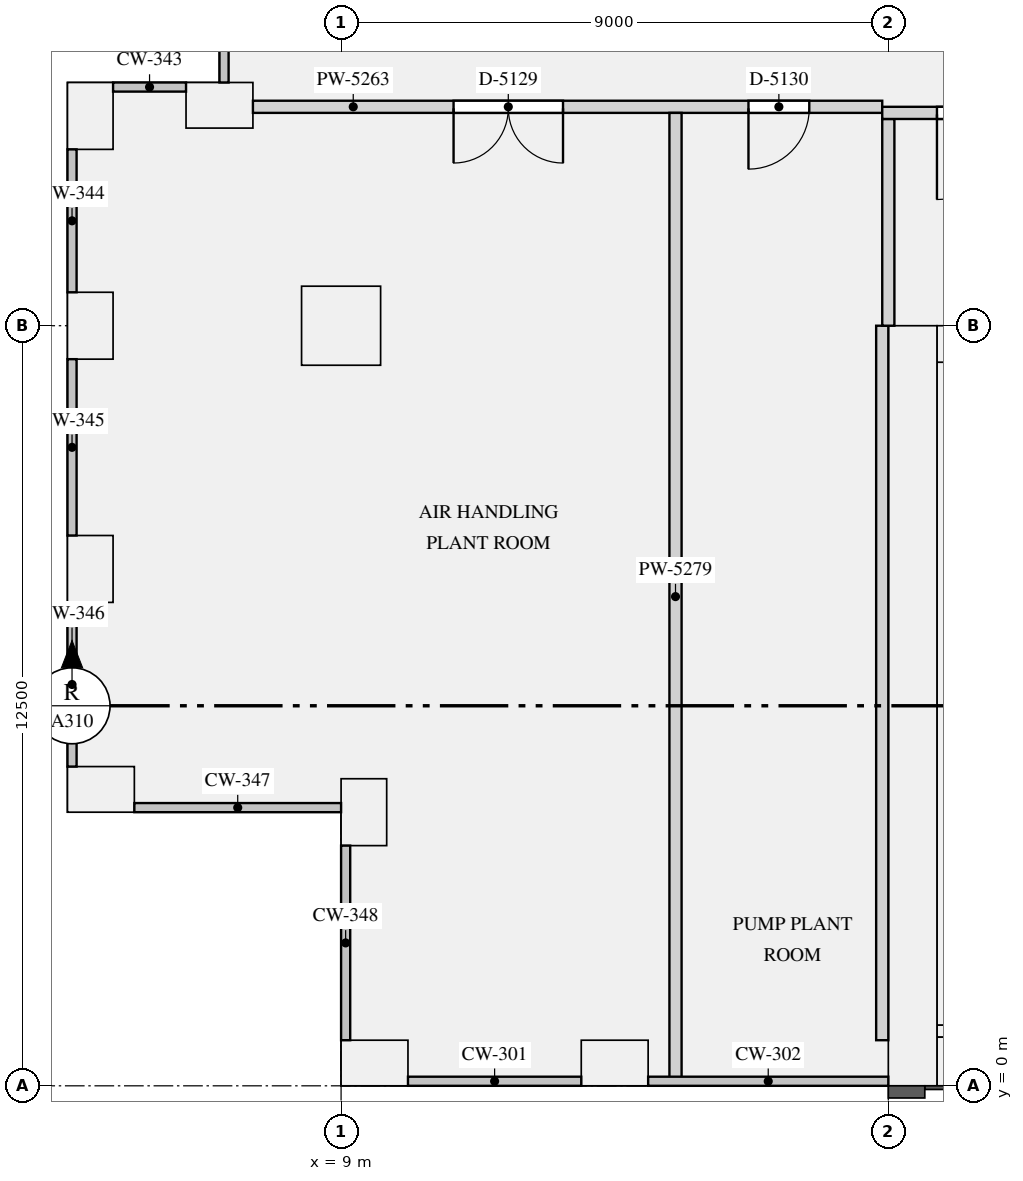
"""IFC4 building model, lengths in metres.
Left out: names, types, materials, properties, quantities, classifications, styles, units other than length and angle.
Written with IfcOpenShell. Run it as: python <this file> out.ifc"""

import sys

from ifc_helpers import new_model, si_unit, direction, frame, frame_2d, origin, origin_2d, place, context, subcontext, project, spatial, rectangle, extrude, element, fill, save


model = new_model("IFC4")
c1 = context("Model", 3, precision=1e-05, world=origin(), true_north=direction((0.0, 1.0)))
c2 = subcontext(c1, "Body", "Model", "MODEL_VIEW")
j1 = project(units=[si_unit("LENGTHUNIT", "METRE"), si_unit("PLANEANGLEUNIT", "RADIAN")], contexts=[c1])
p1 = place(None, origin())
s1 = spatial("IfcSite", under=j1, at=p1, CompositionType="ELEMENT")
p2 = place(p1, origin())
s2 = spatial("IfcBuilding", under=s1, at=p2, CompositionType="ELEMENT")
p3 = place(p2, frame((0.0, 0.0, 137.1)))
s3 = spatial("IfcBuildingStorey", under=s2, at=p3, CompositionType="ELEMENT", Elevation=137.1)
for number, where, z_axis, x_axis in (
    (1, (9.55, 0.375, 0.0), (0.0, 0.0, 1.0), (1.0, 0.0, 0.0)),
    (2, (13.5, 0.375, 0.0), (0.0, 0.0, 1.0), (1.0, 0.0, 0.0)),
    (3, (5.05, 4.875, 0.0), (0.0, 0.0, 1.0), (1.0, 0.0, 0.0)),
    (4, (9.375, 4.5, 0.0), (0.0, 0.0, 1.0), (0.0, -1.0, 0.0)),
    (5, (4.875, 15.95, 0.0), (0.0, 0.0, 1.0), (0.0, -1.0, 0.0)),
    (6, (4.875, 12.5, 0.0), (0.0, 0.0, 1.0), (0.0, -1.0, 0.0)),
    (7, (4.875, 8.5, 0.0), (0.0, 0.0, 1.0), (0.0, -1.0, 0.0)),
    (8, (7.0, 16.125, 0.0), (0.0, 0.0, 1.0), (-1.0, 0.0, 0.0)),
):
    element("IfcColumn", number, at=place(p3, frame(where, z_axis=z_axis, x_axis=x_axis)), inside=s3, PredefinedType="USERDEFINED", context=c2, shape_type="SweptSolid", body=[
        extrude(rectangle(XDim=1.1, YDim=0.75, at=origin_2d()), origin(), (0.0, 0.0, 1.0), 4.2),
    ])
p4 = place(p3, frame((9.0, 12.5, 0.0), z_axis=(0.0, 0.0, 1.0), x_axis=(1.0, 0.0, 0.0)))
e9 = element("IfcColumn", 9, at=p4, inside=s3, PredefinedType="COLUMN", context=c2, shape_type="SweptSolid", body=[
    extrude(rectangle(XDim=1.3, YDim=1.3, at=origin_2d()), origin(), (0.0, 0.0, 1.0), 4.2),
])
p5 = place(p3, frame((18.4, 0.0, 0.0), z_axis=(0.0, 0.0, 1.0), x_axis=(0.0, 1.0, 0.0)))
e10 = element("IfcWall", 10, at=p5, inside=s3, PredefinedType="SHEAR", context=c2, shape_type="SweptSolid", body=[
    extrude(rectangle(XDim=12.5, YDim=0.8, at=frame_2d((6.25, 0.0))), origin(), (0.0, 0.0, 1.0), 4.2),
])
p6 = place(p3, frame((18.8, 0.4, 0.0), z_axis=(0.0, 0.0, 1.0), x_axis=(1.0, 0.0, 0.0)))
e11 = element("IfcWall", 11, at=p6, inside=s3, PredefinedType="SHEAR", context=c2, shape_type="SweptSolid", body=[
    extrude(rectangle(XDim=34.4, YDim=0.8, at=frame_2d((17.2, 0.0))), origin(), (0.0, 0.0, 1.0), 4.2),
])
p7 = place(p3, frame((18.8, 12.2, 0.0), z_axis=(0.0, 0.0, 1.0), x_axis=(1.0, 0.0, 0.0)))
e12 = element("IfcWall", 12, at=p7, inside=s3, PredefinedType="SHEAR", context=c2, shape_type="SweptSolid", body=[
    extrude(rectangle(XDim=34.4, YDim=0.6, at=frame_2d((17.2, 0.0))), origin(), (0.0, 0.0, 1.0), 4.2),
])
p8 = place(p7, frame((24.375, 0.0, 0.0)))
e13 = element("IfcOpeningElement", 13, at=p8, cuts=e12, PredefinedType="OPENING", context=c2, shape_type="SweptSolid", body=[
    extrude(rectangle(XDim=1.1, YDim=2.1, at=frame_2d((0.55, 1.05))), frame((0.0, 0.31, 0.0), z_axis=(0.0, -1.0, 0.0), x_axis=(1.0, 0.0, 0.0)), (0.0, 0.0, 1.0), 0.62),
])
p9 = place(p7, frame((26.625, 0.0, 0.0)))
e14 = element("IfcOpeningElement", 14, at=p9, cuts=e12, PredefinedType="OPENING", context=c2, shape_type="SweptSolid", body=[
    extrude(rectangle(XDim=1.1, YDim=2.1, at=frame_2d((0.55, 1.05))), frame((0.0, 0.31, 0.0), z_axis=(0.0, -1.0, 0.0), x_axis=(1.0, 0.0, 0.0)), (0.0, 0.0, 1.0), 0.62),
])
p10 = place(p7, frame((28.875, 0.0, 0.0)))
e15 = element("IfcOpeningElement", 15, at=p10, cuts=e12, PredefinedType="OPENING", context=c2, shape_type="SweptSolid", body=[
    extrude(rectangle(XDim=1.1, YDim=2.1, at=frame_2d((0.55, 1.05))), frame((0.0, 0.31, 0.0), z_axis=(0.0, -1.0, 0.0), x_axis=(1.0, 0.0, 0.0)), (0.0, 0.0, 1.0), 0.62),
])
p11 = place(p7, frame((18.4, 0.0, 0.0)))
e16 = element("IfcOpeningElement", 16, at=p11, cuts=e12, PredefinedType="OPENING", context=c2, shape_type="SweptSolid", body=[
    extrude(rectangle(XDim=0.9, YDim=2.1, at=frame_2d((0.45, 1.05))), frame((0.0, 0.31, 0.0), z_axis=(0.0, -1.0, 0.0), x_axis=(1.0, 0.0, 0.0)), (0.0, 0.0, 1.0), 0.62),
])
p12 = place(p7, frame((4.45, 0.0, 0.0)))
e17 = element("IfcOpeningElement", 17, at=p12, cuts=e12, PredefinedType="OPENING", context=c2, shape_type="SweptSolid", body=[
    extrude(rectangle(XDim=0.9, YDim=2.1, at=frame_2d((0.45, 1.05))), frame((0.0, 0.31, 0.0), z_axis=(0.0, -1.0, 0.0), x_axis=(1.0, 0.0, 0.0)), (0.0, 0.0, 1.0), 0.62),
])
p13 = place(p7, frame((1.35, 0.0, 0.0)))
e18 = element("IfcOpeningElement", 18, at=p13, cuts=e12, PredefinedType="OPENING", context=c2, shape_type="SweptSolid", body=[
    extrude(rectangle(XDim=1.2, YDim=2.1, at=frame_2d((0.6, 1.05))), frame((0.0, 0.31, 0.0), z_axis=(0.0, -1.0, 0.0), x_axis=(1.0, 0.0, 0.0)), (0.0, 0.0, 1.0), 0.62),
])
p14 = place(p7, frame((31.85, 0.0, 0.0)))
e19 = element("IfcOpeningElement", 19, at=p14, cuts=e12, PredefinedType="OPENING", context=c2, shape_type="SweptSolid", body=[
    extrude(rectangle(XDim=1.2, YDim=2.1, at=frame_2d((0.6, 1.05))), frame((0.0, 0.31, 0.0), z_axis=(0.0, -1.0, 0.0), x_axis=(1.0, 0.0, 0.0)), (0.0, 0.0, 1.0), 0.62),
])
p15 = place(p3, frame((18.9, 1.0, 0.0), z_axis=(0.0, 0.0, 1.0), x_axis=(0.0, 1.0, 0.0)))
e20 = element("IfcWall", 20, at=p15, inside=s3, PredefinedType="SHEAR", context=c2, shape_type="SweptSolid", body=[
    extrude(rectangle(XDim=10.9, YDim=0.2, at=frame_2d((5.45, 0.0))), origin(), (0.0, 0.0, 1.0), 4.2),
])
p16 = place(p3, frame((18.8, 0.9, 0.0), z_axis=(0.0, 0.0, 1.0), x_axis=(1.0, 0.0, 0.0)))
e21 = element("IfcWall", 21, at=p16, inside=s3, PredefinedType="SHEAR", context=c2, shape_type="SweptSolid", body=[
    extrude(rectangle(XDim=34.4, YDim=0.2, at=frame_2d((17.2, 0.0))), origin(), (0.0, 0.0, 1.0), 4.2),
])
p17 = place(p3, frame((18.0, 12.5, 0.0), z_axis=(0.0, 0.0, 1.0), x_axis=(0.0, 1.0, 0.0)))
e22 = element("IfcWall", 22, at=p17, inside=s3, PredefinedType="PARTITIONING", context=c2, shape_type="SweptSolid", body=[
    extrude(rectangle(XDim=3.4, YDim=0.2, at=frame_2d((1.7, 0.0))), origin(), (0.0, 0.0, 1.0), 3.7),
])
p18 = place(p3, frame((17.9, 16.0, 0.0), z_axis=(0.0, 0.0, 1.0), x_axis=(1.0, 0.0, 0.0)))
e23 = element("IfcWall", 23, at=p18, inside=s3, PredefinedType="PARTITIONING", context=c2, shape_type="SweptSolid", body=[
    extrude(rectangle(XDim=36.2, YDim=0.2, at=frame_2d((18.1, 0.0))), origin(), (0.0, 0.0, 1.0), 3.7),
])
p19 = place(p18, frame((0.9, 0.0, 0.0)))
e24 = element("IfcOpeningElement", 24, at=p19, cuts=e23, PredefinedType="OPENING", context=c2, shape_type="SweptSolid", body=[
    extrude(rectangle(XDim=1.4, YDim=2.1, at=frame_2d((0.7, 1.05))), frame((0.0, 0.11, 0.0), z_axis=(0.0, -1.0, 0.0), x_axis=(1.0, 0.0, 0.0)), (0.0, 0.0, 1.0), 0.22),
])
p20 = place(p18, frame((33.9, 0.0, 0.0)))
e25 = element("IfcOpeningElement", 25, at=p20, cuts=e23, PredefinedType="OPENING", context=c2, shape_type="SweptSolid", body=[
    extrude(rectangle(XDim=1.4, YDim=2.1, at=frame_2d((0.7, 1.05))), frame((0.0, 0.11, 0.0), z_axis=(0.0, -1.0, 0.0), x_axis=(1.0, 0.0, 0.0)), (0.0, 0.0, 1.0), 0.22),
])
p21 = place(p3, frame((7.55, 16.1, 0.0), z_axis=(0.0, 0.0, 1.0), x_axis=(1.0, 0.0, 0.0)))
e26 = element("IfcWall", 26, at=p21, inside=s3, PredefinedType="PARTITIONING", context=c2, shape_type="SweptSolid", body=[
    extrude(rectangle(XDim=10.35, YDim=0.2, at=frame_2d((5.175, 0.0))), origin(), (0.0, 0.0, 1.0), 3.7),
])
p22 = place(p21, frame((3.3, 0.0, 0.0)))
e27 = element("IfcOpeningElement", 27, at=p22, cuts=e26, PredefinedType="OPENING", context=c2, shape_type="SweptSolid", body=[
    extrude(rectangle(XDim=1.8, YDim=2.1, at=frame_2d((0.9, 1.05))), frame((0.0, 0.11, 0.0), z_axis=(0.0, -1.0, 0.0), x_axis=(1.0, 0.0, 0.0)), (0.0, 0.0, 1.0), 0.22),
])
p23 = place(p21, frame((8.15, 0.0, 0.0)))
e28 = element("IfcOpeningElement", 28, at=p23, cuts=e26, PredefinedType="OPENING", context=c2, shape_type="SweptSolid", body=[
    extrude(rectangle(XDim=1.0, YDim=2.1, at=frame_2d((0.5, 1.05))), frame((0.0, 0.11, 0.0), z_axis=(0.0, -1.0, 0.0), x_axis=(1.0, 0.0, 0.0)), (0.0, 0.0, 1.0), 0.22),
])
p24 = place(p3, frame((14.5, 0.09, 0.0), z_axis=(0.0, 0.0, 1.0), x_axis=(0.0, 1.0, 0.0)))
e29 = element("IfcWall", 29, at=p24, inside=s3, PredefinedType="PARTITIONING", context=c2, shape_type="SweptSolid", body=[
    extrude(rectangle(XDim=15.91, YDim=0.2, at=frame_2d((7.955, 0.0))), origin(), (0.0, 0.0, 1.0), 3.7),
])
p25 = place(p3, frame((17.9, 0.75, 0.0), z_axis=(0.0, 0.0, 1.0), x_axis=(0.0, 1.0, 0.0)))
e30 = element("IfcWall", 30, at=p25, inside=s3, PredefinedType="PARTITIONING", context=c2, shape_type="SweptSolid", body=[
    extrude(rectangle(XDim=11.75, YDim=0.2, at=frame_2d((5.875, 0.0))), origin(), (0.0, 0.0, 1.0), 3.7),
])
p26 = place(p19, frame((1.4, 0.0, 0.0), z_axis=(0.0, 0.0, 1.0), x_axis=(-1.0, 0.0, 0.0)))
e31 = element("IfcDoor", 31, at=p26, inside=s3, OperationType="SINGLE_SWING_RIGHT", PredefinedType="DOOR", context=c2, shape_type="SweptSolid", body=[
    extrude(rectangle(XDim=1.4, YDim=2.1, at=frame_2d((0.7, 1.05))), frame((0.0, 0.025, 0.0), z_axis=(0.0, -1.0, 0.0), x_axis=(1.0, 0.0, 0.0)), (0.0, 0.0, 1.0), 0.05),
])
fill(e24, e31)
p27 = place(p22, frame((1.8, 0.0, 0.0), z_axis=(0.0, 0.0, 1.0), x_axis=(-1.0, 0.0, 0.0)))
e32 = element("IfcDoor", 32, at=p27, inside=s3, OperationType="DOUBLE_DOOR_SINGLE_SWING", PredefinedType="DOOR", context=c2, shape_type="SweptSolid", body=[
    extrude(rectangle(XDim=1.8, YDim=2.1, at=frame_2d((0.9, 1.05))), frame((0.0, 0.025, 0.0), z_axis=(0.0, -1.0, 0.0), x_axis=(1.0, 0.0, 0.0)), (0.0, 0.0, 1.0), 0.05),
])
fill(e27, e32)
p28 = place(p23, frame((1.0, 0.0, 0.0), z_axis=(0.0, 0.0, 1.0), x_axis=(-1.0, 0.0, 0.0)))
e33 = element("IfcDoor", 33, at=p28, inside=s3, OperationType="SINGLE_SWING_RIGHT", PredefinedType="DOOR", context=c2, shape_type="SweptSolid", body=[
    extrude(rectangle(XDim=1.0, YDim=2.1, at=frame_2d((0.5, 1.05))), frame((0.0, 0.025, 0.0), z_axis=(0.0, -1.0, 0.0), x_axis=(1.0, 0.0, 0.0)), (0.0, 0.0, 1.0), 0.05),
])
fill(e28, e33)
save(model, sys.argv[1])
